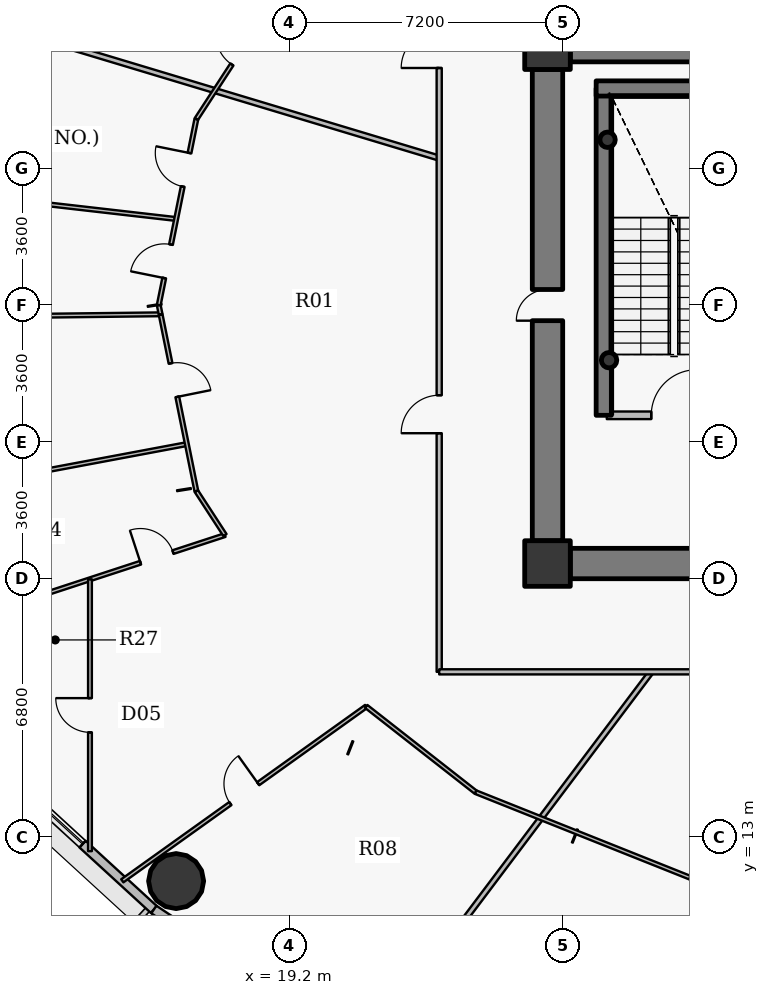
"""IFC4 building model, lengths in metres.
Left out: names, types, materials, properties, quantities, classifications, styles, units other than length and angle.
Written with IfcOpenShell. Run it as: python <this file> out.ifc"""

import sys

from ifc_helpers import new_model, si_unit, direction, frame, frame_2d, origin, origin_2d, place, context, subcontext, project, spatial, rectangle, hollow_circle, extrude, source, transform, mapped, element, fill, save


model = new_model("IFC4")
c1 = context("Model", 3, precision=1e-05, world=origin(), true_north=direction((0.0, 1.0)))
c2 = subcontext(c1, "Body", "Model", "MODEL_VIEW")
j1 = project(units=[si_unit("LENGTHUNIT", "METRE"), si_unit("PLANEANGLEUNIT", "RADIAN")], contexts=[c1])
p1 = place(None, origin())
s1 = spatial("IfcSite", under=j1, at=p1, CompositionType="ELEMENT")
p2 = place(p1, origin())
s2 = spatial("IfcBuilding", under=s1, at=p2, CompositionType="ELEMENT")
p3 = place(p2, frame((0.0, 0.0, 112.2)))
s3 = spatial("IfcBuildingStorey", under=s2, at=p3, CompositionType="ELEMENT", Elevation=112.2)
for number, where, z_axis, x_axis in (
    (1, (26.0, 20.2, 0.0), (0.0, 0.0, 1.0), (1.0, 0.0, 0.0)),
    (2, (26.0, 33.8, 0.0), (0.0, 0.0, 1.0), (1.0, 0.0, 0.0)),
):
    element("IfcColumn", number, at=place(p3, frame(where, z_axis=z_axis, x_axis=x_axis)), inside=s3, PredefinedType="COLUMN", context=c2, shape_type="SweptSolid", body=[
        extrude(rectangle(XDim=1.2, YDim=1.2, at=origin_2d()), origin(), (0.0, 0.0, 1.0), 3.75),
    ])
p4 = place(p3, frame((27.48, 24.1, 0.0), z_axis=(0.0, 0.0, 1.0), x_axis=(0.0, 1.0, 0.0)))
e3 = element("IfcWall", 3, at=p4, inside=s3, PredefinedType="SHEAR", context=c2, shape_type="SweptSolid", body=[
    extrude(rectangle(XDim=8.6, YDim=0.4, at=frame_2d((4.3, 0.0))), origin(), (0.0, 0.0, 1.0), 3.75),
])
p5 = place(p3, frame((27.28, 32.7, 0.0), z_axis=(0.0, 0.0, 1.0), x_axis=(1.0, 0.0, 0.0)))
e4 = element("IfcWall", 4, at=p5, inside=s3, PredefinedType="SHEAR", context=c2, shape_type="SweptSolid", body=[
    extrude(rectangle(XDim=4.1, YDim=0.4, at=frame_2d((2.05, 0.0))), origin(), (0.0, 0.0, 1.0), 3.75),
])
for number, where, z_axis, x_axis in (
    (5, (27.58, 31.35, 0.0), (0.0, 0.0, 1.0), (1.0, 0.0, 0.0)),
    (6, (27.62, 25.55, 0.0), (0.0, 0.0, 1.0), (1.0, 0.0, 0.0)),
):
    element("IfcColumn", number, at=place(p3, frame(where, z_axis=z_axis, x_axis=x_axis)), inside=s3, PredefinedType="COLUMN", context=c2, shape_type="SweptSolid", body=[
        extrude(hollow_circle(Radius=0.203, WallThickness=0.016, at=origin_2d()), origin(), (0.0, 0.0, 1.0), 3.75),
    ])
p6 = place(p3, frame((26.6, 33.8, 0.0), z_axis=(0.0, 0.0, 1.0), x_axis=(1.0, 0.0, 0.0)))
e7 = element("IfcWall", 7, at=p6, inside=s3, PredefinedType="SHEAR", context=c2, shape_type="SweptSolid", body=[
    extrude(rectangle(XDim=18.8, YDim=0.8, at=frame_2d((9.4, 0.0))), origin(), (0.0, 0.0, 1.0), 2.95),
])
p7 = place(p3, frame((45.4, 20.2, 0.0), z_axis=(0.0, 0.0, 1.0), x_axis=(-1.0, 0.0, 0.0)))
e8 = element("IfcWall", 8, at=p7, inside=s3, PredefinedType="SHEAR", context=c2, shape_type="SweptSolid", body=[
    extrude(rectangle(XDim=18.8, YDim=0.8, at=frame_2d((9.4, 0.0))), origin(), (0.0, 0.0, 1.0), 2.95),
])
p8 = place(p7, frame((10.15, 0.0, 0.0)))
e9 = element("IfcOpeningElement", 9, at=p8, cuts=e8, PredefinedType="OPENING", context=c2, shape_type="SweptSolid", body=[
    extrude(rectangle(XDim=1.15, YDim=2.15, at=origin_2d()), frame((0.575, 0.41, 1.075), z_axis=(0.0, -1.0, 0.0), x_axis=(1.0, 0.0, 0.0)), (0.0, 0.0, 1.0), 0.82),
])
p9 = place(p3, frame((26.0, 20.8, 0.0), z_axis=(0.0, 0.0, 1.0), x_axis=(0.0, 1.0, 0.0)))
e10 = element("IfcWall", 10, at=p9, inside=s3, PredefinedType="SHEAR", context=c2, shape_type="SweptSolid", body=[
    extrude(rectangle(XDim=12.4, YDim=0.8, at=frame_2d((6.2, 0.0))), origin(), (0.0, 0.0, 1.0), 2.95),
])
p10 = place(p9, frame((5.79, 0.0, 0.0)))
e11 = element("IfcOpeningElement", 11, at=p10, cuts=e10, PredefinedType="OPENING", context=c2, shape_type="SweptSolid", body=[
    extrude(rectangle(XDim=0.82, YDim=2.1, at=origin_2d()), frame((0.41, 0.41, 1.05), z_axis=(0.0, -1.0, 0.0), x_axis=(1.0, 0.0, 0.0)), (0.0, 0.0, 1.0), 0.82),
])
p11 = place(p3, frame((16.227, 11.844, 0.0), z_axis=(0.0, 0.0, 1.0), x_axis=(1.0, 0.0, 0.0)))
e12 = element("IfcColumn", 12, at=p11, inside=s3, PredefinedType="COLUMN", context=c2, shape_type="SweptSolid", body=[
    extrude(hollow_circle(Radius=0.725, WallThickness=0.042, at=origin_2d()), origin(), (0.0, 0.0, 1.0), 3.75),
])
p12 = place(p3, frame((15.642, 11.097, 0.0), z_axis=(0.0, 0.0, 1.0), x_axis=(-0.737113356241, 0.675769117414, 0.0)))
e13 = element("IfcWall", 13, at=p12, inside=s3, PredefinedType="SOLIDWALL", context=c2, shape_type="SweptSolid", body=[
    extrude(rectangle(XDim=3.976, YDim=0.24, at=frame_2d((1.988, 0.0))), origin(), (0.0, 0.0, 1.0), 3.5),
])
p13 = place(p12, frame((2.546, 0.0, 0.9)))
e14 = element("IfcOpeningElement", 14, at=p13, cuts=e13, PredefinedType="OPENING", context=c2, shape_type="SweptSolid", body=[
    extrude(rectangle(XDim=1.25, YDim=1.65, at=origin_2d()), frame((0.625, 0.13, 0.825), z_axis=(0.0, -1.0, 0.0), x_axis=(1.0, 0.0, 0.0)), (0.0, 0.0, 1.0), 0.26),
])
p14 = place(p3, frame((19.075, 8.801, 0.0), z_axis=(0.0, 0.0, 1.0), x_axis=(-0.831221811447, 0.555940914284, 0.0)))
e15 = element("IfcWall", 15, at=p14, inside=s3, PredefinedType="SOLIDWALL", context=c2, shape_type="SweptSolid", body=[
    extrude(rectangle(XDim=4.13, YDim=0.24, at=frame_2d((2.065, 0.0))), origin(), (0.0, 0.0, 1.0), 3.5),
])
p15 = place(p14, frame((1.065, 0.0, 0.9)))
e16 = element("IfcOpeningElement", 16, at=p15, cuts=e15, PredefinedType="OPENING", context=c2, shape_type="SweptSolid", body=[
    extrude(rectangle(XDim=2.0, YDim=1.75, at=origin_2d()), frame((1.0, 0.13, 0.875), z_axis=(0.0, -1.0, 0.0), x_axis=(1.0, 0.0, 0.0)), (0.0, 0.0, 1.0), 0.26),
])
p16 = place(p3, frame((7.255, 26.655, 0.0), z_axis=(0.0, 0.0, 1.0), x_axis=(0.999927994094, 0.012000276098, 0.0)))
e17 = element("IfcWall", 17, at=p16, inside=s3, PredefinedType="PARTITIONING", context=c2, shape_type="SweptSolid", body=[
    extrude(rectangle(XDim=8.565, YDim=0.1, at=frame_2d((4.283, 0.0))), origin(), (0.0, 0.0, 1.0), 2.935),
])
p17 = place(p3, frame((7.548, 30.259, 0.0), z_axis=(0.0, 0.0, 1.0), x_axis=(0.993502465776, -0.11381059044, 0.0)))
e18 = element("IfcWall", 18, at=p17, inside=s3, PredefinedType="PARTITIONING", context=c2, shape_type="SweptSolid", body=[
    extrude(rectangle(XDim=8.737, YDim=0.1, at=frame_2d((4.369, 0.0))), origin(), (0.0, 0.0, 1.0), 2.935),
])
p18 = place(p3, frame((8.1, 21.765, 0.0), z_axis=(0.0, 0.0, 1.0), x_axis=(0.982848598081, 0.184414297849, 0.0)))
e19 = element("IfcWall", 19, at=p18, inside=s3, PredefinedType="PARTITIONING", context=c2, shape_type="SweptSolid", body=[
    extrude(rectangle(XDim=8.556, YDim=0.1, at=frame_2d((4.278, 0.0))), origin(), (0.0, 0.0, 1.0), 2.935),
])
p19 = place(p3, frame((9.215, 35.062, 0.0), z_axis=(0.0, 0.0, 1.0), x_axis=(0.957569176287, -0.288203526393, 0.0)))
e20 = element("IfcWall", 20, at=p19, inside=s3, PredefinedType="PARTITIONING", context=c2, shape_type="SweptSolid", body=[
    extrude(rectangle(XDim=14.552, YDim=0.135, at=frame_2d((7.276, 0.0))), origin(), (0.0, 0.0, 1.0), 2.935),
])
p20 = place(p3, frame((9.533, 18.337, 0.0), z_axis=(0.0, 0.0, 1.0), x_axis=(0.950384937961, 0.311076308478, 0.0)))
e21 = element("IfcWall", 21, at=p20, inside=s3, PredefinedType="PARTITIONING", context=c2, shape_type="SweptSolid", body=[
    extrude(rectangle(XDim=8.396, YDim=0.1, at=frame_2d((4.198, 0.0))), origin(), (0.0, 0.0, 1.0), 2.935),
])
p21 = place(p20, frame((6.057, 0.0, 0.0)))
e22 = element("IfcOpeningElement", 22, at=p21, cuts=e21, PredefinedType="OPENING", context=c2, shape_type="SweptSolid", body=[
    extrude(rectangle(XDim=0.9, YDim=2.1, at=origin_2d()), frame((0.45, 0.06, 1.05), z_axis=(0.0, -1.0, 0.0), x_axis=(1.0, 0.0, 0.0)), (0.0, 0.0, 1.0), 0.12),
])
p22 = place(p20, frame((0.88, 0.0, 0.0)))
e23 = element("IfcOpeningElement", 23, at=p22, cuts=e21, PredefinedType="OPENING", context=c2, shape_type="SweptSolid", body=[
    extrude(rectangle(XDim=0.82, YDim=2.1, at=origin_2d()), frame((0.41, 0.06, 1.05), z_axis=(0.0, -1.0, 0.0), x_axis=(1.0, 0.0, 0.0)), (0.0, 0.0, 1.0), 0.12),
])
p23 = place(p3, frame((13.96, 12.631, 0.0), z_axis=(0.0, 0.0, 1.0), x_axis=(0.0, 1.0, 0.0)))
e24 = element("IfcWall", 24, at=p23, inside=s3, PredefinedType="PARTITIONING", context=c2, shape_type="SweptSolid", body=[
    extrude(rectangle(XDim=7.154, YDim=0.1, at=frame_2d((3.577, 0.0))), origin(), (0.0, 0.0, 1.0), 2.935),
])
p24 = place(p23, frame((3.127, 0.0, 0.0)))
e25 = element("IfcOpeningElement", 25, at=p24, cuts=e24, PredefinedType="OPENING", context=c2, shape_type="SweptSolid", body=[
    extrude(rectangle(XDim=0.9, YDim=2.1, at=origin_2d()), frame((0.45, 0.06, 1.05), z_axis=(0.0, -1.0, 0.0), x_axis=(1.0, 0.0, 0.0)), (0.0, 0.0, 1.0), 0.12),
])
p25 = place(p3, frame((14.811, 11.851, 0.0), z_axis=(0.0, 0.0, 1.0), x_axis=(0.813476205606, 0.581598197137, 0.0)))
e26 = element("IfcWall", 26, at=p25, inside=s3, PredefinedType="PARTITIONING", context=c2, shape_type="SweptSolid", body=[
    extrude(rectangle(XDim=7.889, YDim=0.1, at=frame_2d((3.945, 0.0))), origin(), (0.0, 0.0, 1.0), 2.935),
])
p26 = place(p25, frame((3.495, 0.0, 0.0)))
e27 = element("IfcOpeningElement", 27, at=p26, cuts=e26, PredefinedType="OPENING", context=c2, shape_type="SweptSolid", body=[
    extrude(rectangle(XDim=0.9, YDim=2.1, at=origin_2d()), frame((0.45, 0.06, 1.05), z_axis=(0.0, -1.0, 0.0), x_axis=(1.0, 0.0, 0.0)), (0.0, 0.0, 1.0), 0.12),
])
p27 = place(p3, frame((15.77, 27.0, 0.0), z_axis=(0.0, 0.0, 1.0), x_axis=(0.198585481658, -0.980083571169, 0.0)))
e28 = element("IfcWall", 28, at=p27, inside=s3, PredefinedType="PARTITIONING", context=c2, shape_type="SweptSolid", body=[
    extrude(rectangle(XDim=0.247, YDim=0.1, at=frame_2d((0.124, 0.0))), origin(), (0.0, 0.0, 1.0), 2.935),
])
p28 = place(p3, frame((15.77, 27.0, 0.0), z_axis=(0.0, 0.0, 1.0), x_axis=(0.19822142127, 0.980157267049, 0.0)))
e29 = element("IfcWall", 29, at=p28, inside=s3, PredefinedType="PARTITIONING", context=c2, shape_type="SweptSolid", body=[
    extrude(rectangle(XDim=4.994, YDim=0.1, at=frame_2d((2.497, 0.0))), origin(), (0.0, 0.0, 1.0), 2.935),
])
p29 = place(p28, frame((3.183, 0.0, 0.0)))
e30 = element("IfcOpeningElement", 30, at=p29, cuts=e29, PredefinedType="OPENING", context=c2, shape_type="SweptSolid", body=[
    extrude(rectangle(XDim=0.9, YDim=2.1, at=origin_2d()), frame((0.45, 0.06, 1.05), z_axis=(0.0, -1.0, 0.0), x_axis=(1.0, 0.0, 0.0)), (0.0, 0.0, 1.0), 0.12),
])
p30 = place(p28, frame((0.725, 0.0, 0.0)))
e31 = element("IfcOpeningElement", 31, at=p30, cuts=e29, PredefinedType="OPENING", context=c2, shape_type="SweptSolid", body=[
    extrude(rectangle(XDim=0.9, YDim=2.1, at=origin_2d()), frame((0.45, 0.06, 1.05), z_axis=(0.0, -1.0, 0.0), x_axis=(1.0, 0.0, 0.0)), (0.0, 0.0, 1.0), 0.12),
])
p31 = place(p3, frame((15.821, 26.748, 0.0), z_axis=(0.0, 0.0, 1.0), x_axis=(0.198216867743, -0.980158187918, 0.0)))
e32 = element("IfcWall", 32, at=p31, inside=s3, PredefinedType="PARTITIONING", context=c2, shape_type="SweptSolid", body=[
    extrude(rectangle(XDim=4.737, YDim=0.1, at=frame_2d((2.369, 0.0))), origin(), (0.0, 0.0, 1.0), 2.935),
])
p32 = place(p31, frame((1.307, 0.0, 0.0)))
e33 = element("IfcOpeningElement", 33, at=p32, cuts=e32, PredefinedType="OPENING", context=c2, shape_type="SweptSolid", body=[
    extrude(rectangle(XDim=0.9, YDim=2.1, at=origin_2d()), frame((0.45, 0.06, 1.05), z_axis=(0.0, -1.0, 0.0), x_axis=(1.0, 0.0, 0.0)), (0.0, 0.0, 1.0), 0.12),
])
p33 = place(p3, frame((16.76, 22.105, 0.0), z_axis=(0.0, 0.0, 1.0), x_axis=(0.54547956044, -0.83812412514, 0.0)))
e34 = element("IfcWall", 34, at=p33, inside=s3, PredefinedType="PARTITIONING", context=c2, shape_type="SweptSolid", body=[
    extrude(rectangle(XDim=1.38, YDim=0.1, at=frame_2d((0.69, 0.0))), origin(), (0.0, 0.0, 1.0), 2.935),
])
p34 = place(p3, frame((16.76, 31.895, 0.0), z_axis=(0.0, 0.0, 1.0), x_axis=(0.545405249109, 0.838172484781, 0.0)))
e35 = element("IfcWall", 35, at=p34, inside=s3, PredefinedType="PARTITIONING", context=c2, shape_type="SweptSolid", body=[
    extrude(rectangle(XDim=5.269, YDim=0.1, at=frame_2d((2.634, 0.0))), origin(), (0.0, 0.0, 1.0), 2.935),
])
p35 = place(p34, frame((1.713, 0.0, 0.0)))
e36 = element("IfcOpeningElement", 36, at=p35, cuts=e35, PredefinedType="OPENING", context=c2, shape_type="SweptSolid", body=[
    extrude(rectangle(XDim=0.9, YDim=2.1, at=origin_2d()), frame((0.45, 0.06, 1.05), z_axis=(0.0, -1.0, 0.0), x_axis=(1.0, 0.0, 0.0)), (0.0, 0.0, 1.0), 0.12),
])
p36 = place(p3, frame((21.229, 16.44, 0.0), z_axis=(0.0, 0.0, 1.0), x_axis=(0.787324700524, -0.616538576201, 0.0)))
e37 = element("IfcWall", 37, at=p36, inside=s3, PredefinedType="PARTITIONING", context=c2, shape_type="SweptSolid", body=[
    extrude(rectangle(XDim=3.658, YDim=0.1, at=frame_2d((1.829, 0.0))), origin(), (0.0, 0.0, 1.0), 2.935),
])
p37 = place(p3, frame((21.43, 7.665, 0.0), z_axis=(0.0, 0.0, 1.0), x_axis=(0.601821582461, 0.798630567211, 0.0)))
e38 = element("IfcWall", 38, at=p37, inside=s3, PredefinedType="PARTITIONING", context=c2, shape_type="SweptSolid", body=[
    extrude(rectangle(XDim=12.127, YDim=0.135, at=frame_2d((6.063, 0.0))), origin(), (0.0, 0.0, 1.0), 2.935),
])
p38 = place(p3, frame((23.15, 17.35, 0.0), z_axis=(0.0, 0.0, 1.0), x_axis=(0.0, 1.0, 0.0)))
e39 = element("IfcWall", 39, at=p38, inside=s3, PredefinedType="PARTITIONING", context=c2, shape_type="SweptSolid", body=[
    extrude(rectangle(XDim=19.3, YDim=0.135, at=frame_2d((9.65, 0.0))), origin(), (0.0, 0.0, 1.0), 2.935),
])
p39 = place(p38, frame((15.889, 0.0, 0.0)))
e40 = element("IfcOpeningElement", 40, at=p39, cuts=e39, PredefinedType="OPENING", context=c2, shape_type="SweptSolid", body=[
    extrude(rectangle(XDim=1.0, YDim=2.15, at=origin_2d()), frame((0.5, 0.078, 1.075), z_axis=(0.0, -1.0, 0.0), x_axis=(1.0, 0.0, 0.0)), (0.0, 0.0, 1.0), 0.155),
])
p40 = place(p38, frame((6.279, 0.0, 0.0)))
e41 = element("IfcOpeningElement", 41, at=p40, cuts=e39, PredefinedType="OPENING", context=c2, shape_type="SweptSolid", body=[
    extrude(rectangle(XDim=1.0, YDim=2.15, at=origin_2d()), frame((0.5, 0.078, 1.075), z_axis=(0.0, -1.0, 0.0), x_axis=(1.0, 0.0, 0.0)), (0.0, 0.0, 1.0), 0.155),
])
p41 = place(p3, frame((23.15, 17.35, 0.0), z_axis=(0.0, 0.0, 1.0), x_axis=(1.0, 0.0, 0.0)))
e42 = element("IfcWall", 42, at=p41, inside=s3, PredefinedType="PARTITIONING", context=c2, shape_type="SweptSolid", body=[
    extrude(rectangle(XDim=12.808, YDim=0.135, at=frame_2d((6.404, 0.0))), origin(), (0.0, 0.0, 1.0), 2.935),
])
p42 = place(p41, frame((8.673, 0.0, 0.0)))
e43 = element("IfcOpeningElement", 43, at=p42, cuts=e42, PredefinedType="OPENING", context=c2, shape_type="SweptSolid", body=[
    extrude(rectangle(XDim=1.0, YDim=2.15, at=origin_2d()), frame((0.5, 0.078, 1.075), z_axis=(0.0, -1.0, 0.0), x_axis=(1.0, 0.0, 0.0)), (0.0, 0.0, 1.0), 0.155),
])
p43 = place(p3, frame((24.109, 14.184, 0.0), z_axis=(0.0, 0.0, 1.0), x_axis=(0.928803554156, -0.370572473055, 0.0)))
e44 = element("IfcWall", 44, at=p43, inside=s3, PredefinedType="PARTITIONING", context=c2, shape_type="SweptSolid", body=[
    extrude(rectangle(XDim=6.072, YDim=0.1, at=frame_2d((3.036, 0.0))), origin(), (0.0, 0.0, 1.0), 2.935),
])
p44 = place(p3, frame((27.56, 24.1, 0.0), z_axis=(0.0, 0.0, 1.0), x_axis=(1.0, 0.0, 0.0)))
e45 = element("IfcWall", 45, at=p44, inside=s3, PredefinedType="PARTITIONING", context=c2, shape_type="SweptSolid", body=[
    extrude(rectangle(XDim=3.54, YDim=0.2, at=frame_2d((1.77, 0.0))), origin(), (0.0, 0.0, 1.0), 3.5),
])
p45 = place(p44, frame((1.17, 0.0, 0.0)))
e46 = element("IfcOpeningElement", 46, at=p45, cuts=e45, PredefinedType="OPENING", context=c2, shape_type="SweptSolid", body=[
    extrude(rectangle(XDim=1.2, YDim=2.15, at=origin_2d()), frame((0.6, 0.11, 1.075), z_axis=(0.0, -1.0, 0.0), x_axis=(1.0, 0.0, 0.0)), (0.0, 0.0, 1.0), 0.22),
])
p46 = place(p3, frame((28.685, 5.296, 0.0), z_axis=(0.0, 0.0, 1.0), x_axis=(0.319387131438, 0.947624324441, 0.0)))
e47 = element("IfcWall", 47, at=p46, inside=s3, PredefinedType="PARTITIONING", context=c2, shape_type="SweptSolid", body=[
    extrude(rectangle(XDim=6.858, YDim=0.1, at=frame_2d((3.429, 0.0))), origin(), (0.0, 0.0, 1.0), 2.935),
])
p47 = place(p46, frame((2.979, 0.0, 0.0)))
e48 = element("IfcOpeningElement", 48, at=p47, cuts=e47, PredefinedType="OPENING", context=c2, shape_type="SweptSolid", body=[
    extrude(rectangle(XDim=0.9, YDim=2.1, at=origin_2d()), frame((0.45, 0.06, 1.05), z_axis=(0.0, -1.0, 0.0), x_axis=(1.0, 0.0, 0.0)), (0.0, 0.0, 1.0), 0.12),
])
p48 = place(p3, frame((25.6, 33.893, 0.0), z_axis=(0.0, 0.0, 1.0), x_axis=(0.0, -1.0, 0.0)))
e49 = element("IfcWall", 49, at=p48, inside=s3, PredefinedType="PARTITIONING", context=c2, shape_type="SweptSolid", body=[
    extrude(rectangle(XDim=0.683, YDim=0.135, at=frame_2d((0.341, 0.0))), origin(), (0.0, 0.0, 1.0), 3.5),
])
p49 = place(p3, frame((25.6, 20.79, 0.0), z_axis=(0.0, 0.0, 1.0), x_axis=(0.0, -1.0, 0.0)))
e50 = element("IfcWall", 50, at=p49, inside=s3, PredefinedType="PARTITIONING", context=c2, shape_type="SweptSolid", body=[
    extrude(rectangle(XDim=0.99, YDim=0.135, at=frame_2d((0.495, 0.0))), origin(), (0.0, 0.0, 1.0), 3.5),
])
p50 = place(p3, frame((25.907, 19.8, 0.0), z_axis=(0.0, 0.0, 1.0), x_axis=(1.0, 0.0, 0.0)))
e51 = element("IfcWall", 51, at=p50, inside=s3, PredefinedType="PARTITIONING", context=c2, shape_type="SweptSolid", body=[
    extrude(rectangle(XDim=0.683, YDim=0.135, at=frame_2d((0.341, 0.0))), origin(), (0.0, 0.0, 1.0), 2.935),
])
m1 = source(origin(), c2, "Body", "SweptSolid", [
    extrude(rectangle(XDim=1.25, YDim=1.65, at=origin_2d()), frame((0.625, 0.03, 0.825), z_axis=(0.0, -1.0, 0.0), x_axis=(1.0, 0.0, 0.0)), (0.0, 0.0, 1.0), 0.06),
])
p51 = place(p13, origin())
e52 = element("IfcWindow", 52, at=p51, inside=s3, PartitioningType="SINGLE_PANEL", PredefinedType="WINDOW", context=c2, shape_type="MappedRepresentation", body=[
    mapped(m1, transform((0.0, 0.0, 0.0), x_axis=(1.0, 0.0, 0.0), y_axis=(0.0, 1.0, 0.0), z_axis=(0.0, 0.0, 1.0), scale=1.0)),
])
fill(e14, e52)
m2 = source(origin(), c2, "Body", "SweptSolid", [
    extrude(rectangle(XDim=0.82, YDim=2.1, at=origin_2d()), frame((0.41, 0.025, 1.05), z_axis=(0.0, -1.0, 0.0), x_axis=(1.0, 0.0, 0.0)), (0.0, 0.0, 1.0), 0.05),
])
p52 = place(p10, origin())
e53 = element("IfcDoor", 53, at=p52, inside=s3, OperationType="SINGLE_SWING_LEFT", PredefinedType="DOOR", context=c2, shape_type="MappedRepresentation", body=[
    mapped(m2, transform((0.0, 0.0, 0.0), x_axis=(1.0, 0.0, 0.0), y_axis=(0.0, 1.0, 0.0), z_axis=(0.0, 0.0, 1.0), scale=1.0)),
])
fill(e11, e53)
m3 = source(origin(), c2, "Body", "SweptSolid", [
    extrude(rectangle(XDim=1.2, YDim=2.15, at=origin_2d()), frame((0.6, 0.025, 1.075), z_axis=(0.0, -1.0, 0.0), x_axis=(1.0, 0.0, 0.0)), (0.0, 0.0, 1.0), 0.05),
])
p53 = place(p45, origin())
e54 = element("IfcDoor", 54, at=p53, inside=s3, OperationType="SINGLE_SWING_RIGHT", PredefinedType="DOOR", context=c2, shape_type="MappedRepresentation", body=[
    mapped(m3, transform((0.0, 0.0, 0.0), x_axis=(1.0, 0.0, 0.0), y_axis=(0.0, 1.0, 0.0), z_axis=(0.0, 0.0, 1.0), scale=1.0)),
])
fill(e46, e54)
m4 = source(origin(), c2, "Body", "SweptSolid", [
    extrude(rectangle(XDim=1.0, YDim=2.15, at=origin_2d()), frame((0.5, 0.025, 1.075), z_axis=(0.0, -1.0, 0.0), x_axis=(1.0, 0.0, 0.0)), (0.0, 0.0, 1.0), 0.05),
])
p54 = place(p39, origin())
e55 = element("IfcDoor", 55, at=p54, inside=s3, OperationType="SINGLE_SWING_LEFT", PredefinedType="DOOR", context=c2, shape_type="MappedRepresentation", body=[
    mapped(m4, transform((0.0, 0.0, 0.0), x_axis=(1.0, 0.0, 0.0), y_axis=(0.0, 1.0, 0.0), z_axis=(0.0, 0.0, 1.0), scale=1.0)),
])
fill(e40, e55)
m5 = source(origin(), c2, "Body", "SweptSolid", [
    extrude(rectangle(XDim=0.9, YDim=2.1, at=origin_2d()), frame((0.45, 0.025, 1.05), z_axis=(0.0, -1.0, 0.0), x_axis=(1.0, 0.0, 0.0)), (0.0, 0.0, 1.0), 0.05),
])
p55 = place(p35, origin())
e56 = element("IfcDoor", 56, at=p55, inside=s3, OperationType="SINGLE_SWING_RIGHT", PredefinedType="DOOR", context=c2, shape_type="MappedRepresentation", body=[
    mapped(m5, transform((0.0, 0.0, 0.0), x_axis=(1.0, 0.0, 0.0), y_axis=(0.0, 1.0, 0.0), z_axis=(0.0, 0.0, 1.0), scale=1.0)),
])
fill(e36, e56)
p56 = place(p40, origin())
e57 = element("IfcDoor", 57, at=p56, inside=s3, OperationType="SINGLE_SWING_LEFT", PredefinedType="DOOR", context=c2, shape_type="MappedRepresentation", body=[
    mapped(m4, transform((0.0, 0.0, 0.0), x_axis=(1.0, 0.0, 0.0), y_axis=(0.0, 1.0, 0.0), z_axis=(0.0, 0.0, 1.0), scale=1.0)),
])
fill(e41, e57)
p57 = place(p29, origin())
e58 = element("IfcDoor", 58, at=p57, inside=s3, OperationType="SINGLE_SWING_RIGHT", PredefinedType="DOOR", context=c2, shape_type="MappedRepresentation", body=[
    mapped(m5, transform((0.0, 0.0, 0.0), x_axis=(1.0, 0.0, 0.0), y_axis=(0.0, 1.0, 0.0), z_axis=(0.0, 0.0, 1.0), scale=1.0)),
])
fill(e30, e58)
p58 = place(p30, origin())
e59 = element("IfcDoor", 59, at=p58, inside=s3, OperationType="SINGLE_SWING_LEFT", PredefinedType="DOOR", context=c2, shape_type="MappedRepresentation", body=[
    mapped(m5, transform((0.0, 0.0, 0.0), x_axis=(1.0, 0.0, 0.0), y_axis=(0.0, 1.0, 0.0), z_axis=(0.0, 0.0, 1.0), scale=1.0)),
])
fill(e31, e59)
p59 = place(p32, origin())
e60 = element("IfcDoor", 60, at=p59, inside=s3, OperationType="SINGLE_SWING_RIGHT", PredefinedType="DOOR", context=c2, shape_type="MappedRepresentation", body=[
    mapped(m5, transform((0.0, 0.0, 0.0), x_axis=(1.0, 0.0, 0.0), y_axis=(0.0, 1.0, 0.0), z_axis=(0.0, 0.0, 1.0), scale=1.0)),
])
fill(e33, e60)
p60 = place(p21, origin())
e61 = element("IfcDoor", 61, at=p60, inside=s3, OperationType="SINGLE_SWING_LEFT", PredefinedType="DOOR", context=c2, shape_type="MappedRepresentation", body=[
    mapped(m5, transform((0.0, 0.0, 0.0), x_axis=(1.0, 0.0, 0.0), y_axis=(0.0, 1.0, 0.0), z_axis=(0.0, 0.0, 1.0), scale=1.0)),
])
fill(e22, e61)
p61 = place(p26, origin())
e62 = element("IfcDoor", 62, at=p61, inside=s3, OperationType="SINGLE_SWING_RIGHT", PredefinedType="DOOR", context=c2, shape_type="MappedRepresentation", body=[
    mapped(m5, transform((0.0, 0.0, 0.0), x_axis=(1.0, 0.0, 0.0), y_axis=(0.0, 1.0, 0.0), z_axis=(0.0, 0.0, 1.0), scale=1.0)),
])
fill(e27, e62)
p62 = place(p24, origin())
e63 = element("IfcDoor", 63, at=p62, inside=s3, OperationType="SINGLE_SWING_RIGHT", PredefinedType="DOOR", context=c2, shape_type="MappedRepresentation", body=[
    mapped(m5, transform((0.0, 0.0, 0.0), x_axis=(1.0, 0.0, 0.0), y_axis=(0.0, 1.0, 0.0), z_axis=(0.0, 0.0, 1.0), scale=1.0)),
])
fill(e25, e63)
save(model, sys.argv[1])
